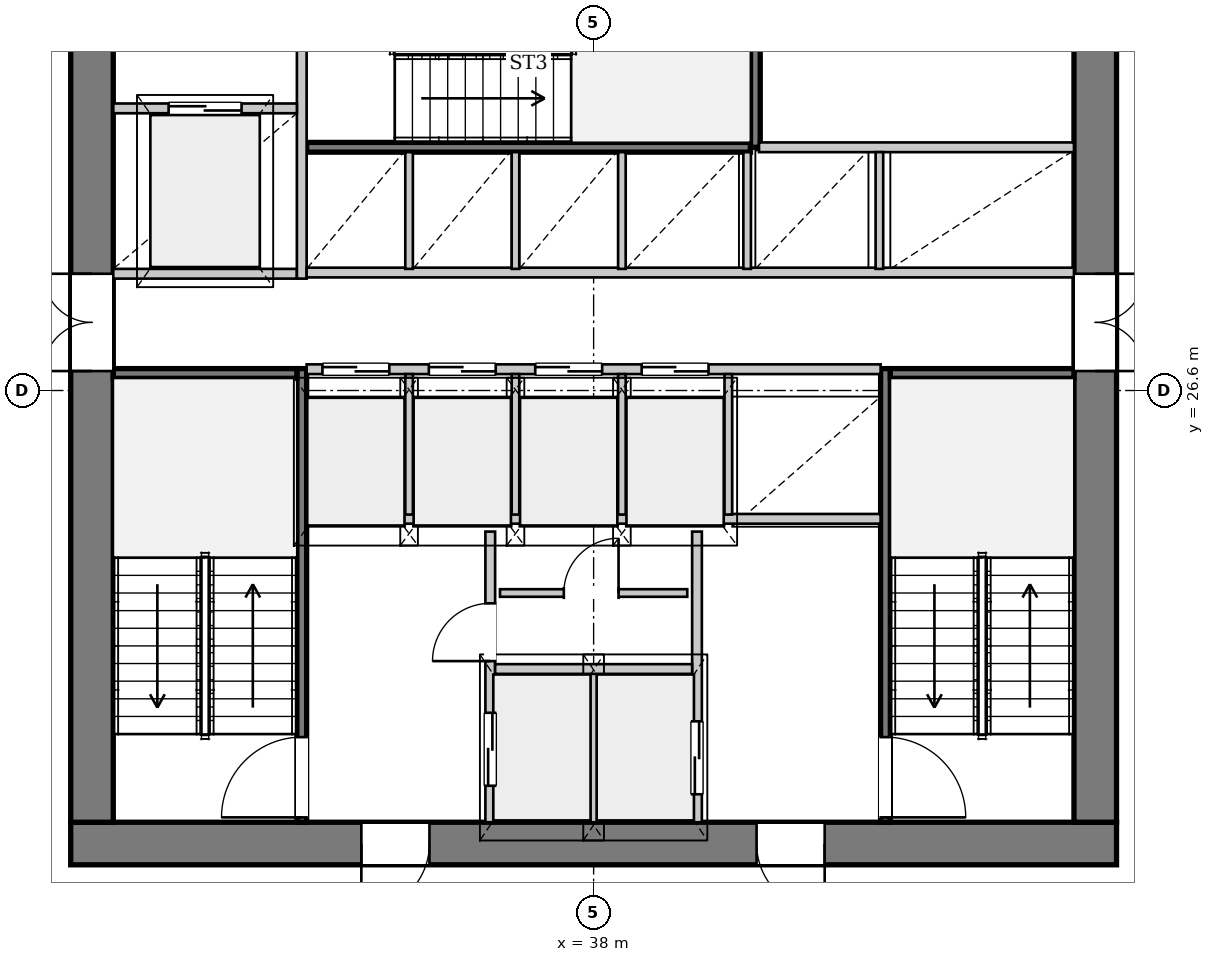
"""IFC4 building model, lengths in metres.
Left out: names, types, materials, properties, quantities, classifications, styles, units other than length and angle.
Written with IfcOpenShell. Run it as: python <this file> out.ifc"""

import sys

from ifc_helpers import new_model, si_unit, direction, frame, frame_2d, origin, place, context, subcontext, project, spatial, rectangle, extrude, source, transform, mapped, element, fill, save


model = new_model("IFC4")
c1 = context("Model", 3, precision=1e-05, world=origin(), true_north=direction((0.0, 1.0)))
c2 = subcontext(c1, "Body", "Model", "MODEL_VIEW")
j1 = project(units=[si_unit("LENGTHUNIT", "METRE"), si_unit("PLANEANGLEUNIT", "RADIAN")], contexts=[c1])
p1 = place(None, origin())
s1 = spatial("IfcSite", under=j1, at=p1, CompositionType="ELEMENT")
p2 = place(p1, origin())
s2 = spatial("IfcBuilding", under=s1, at=p2, CompositionType="ELEMENT")
p3 = place(p2, frame((0.0, 0.0, 95.05)))
s3 = spatial("IfcBuildingStorey", under=s2, at=p3, CompositionType="ELEMENT", Elevation=95.05)
p4 = place(p3, frame((46.6, 19.15, 0.0), z_axis=(0.0, 0.0, 1.0), x_axis=(-1.0, 0.0, 0.0)))
e1 = element("IfcWall", 1, at=p4, inside=s3, PredefinedType="SHEAR", context=c2, shape_type="SweptSolid", body=[
    extrude(rectangle(XDim=17.2, YDim=0.7, at=frame_2d((8.6, 0.0))), origin(), (0.0, 0.0, 1.0), 3.3),
])
p5 = place(p4, frame((4.8, 0.0, 0.0)))
e2 = element("IfcOpeningElement", 2, at=p5, cuts=e1, PredefinedType="OPENING", context=c2, shape_type="SweptSolid", body=[
    extrude(rectangle(XDim=1.12, YDim=2.25, at=frame_2d((0.56, 1.125))), frame((0.0, 0.36, 0.0), z_axis=(0.0, -1.0, 0.0), x_axis=(1.0, 0.0, 0.0)), (0.0, 0.0, 1.0), 0.72),
])
p6 = place(p4, frame((11.3, 0.0, 0.0)))
e3 = element("IfcOpeningElement", 3, at=p6, cuts=e1, PredefinedType="OPENING", context=c2, shape_type="SweptSolid", body=[
    extrude(rectangle(XDim=1.12, YDim=2.25, at=frame_2d((0.56, 1.125))), frame((0.0, 0.36, 0.0), z_axis=(0.0, -1.0, 0.0), x_axis=(1.0, 0.0, 0.0)), (0.0, 0.0, 1.0), 0.72),
])
p7 = place(p3, frame((29.75, 19.5, 0.0), z_axis=(0.0, 0.0, 1.0), x_axis=(0.0, 1.0, 0.0)))
e4 = element("IfcWall", 4, at=p7, inside=s3, PredefinedType="SHEAR", context=c2, shape_type="SweptSolid", body=[
    extrude(rectangle(XDim=14.2, YDim=0.7, at=frame_2d((7.1, 0.0))), origin(), (0.0, 0.0, 1.0), 3.3),
])
p8 = place(p7, frame((7.42, 0.0, 0.0)))
e5 = element("IfcOpeningElement", 5, at=p8, cuts=e4, PredefinedType="OPENING", context=c2, shape_type="SweptSolid", body=[
    extrude(rectangle(XDim=1.6, YDim=2.2, at=frame_2d((0.8, 1.1))), frame((0.0, 0.36, 0.0), z_axis=(0.0, -1.0, 0.0), x_axis=(1.0, 0.0, 0.0)), (0.0, 0.0, 1.0), 0.72),
])
p9 = place(p3, frame((46.25, 33.7, 0.0), z_axis=(0.0, 0.0, 1.0), x_axis=(0.0, -1.0, 0.0)))
e6 = element("IfcWall", 6, at=p9, inside=s3, PredefinedType="SHEAR", context=c2, shape_type="SweptSolid", body=[
    extrude(rectangle(XDim=14.2, YDim=0.7, at=frame_2d((7.1, 0.0))), origin(), (0.0, 0.0, 1.0), 3.3),
])
p10 = place(p9, frame((5.18, 0.0, 0.0)))
e7 = element("IfcOpeningElement", 7, at=p10, cuts=e6, PredefinedType="OPENING", context=c2, shape_type="SweptSolid", body=[
    extrude(rectangle(XDim=1.6, YDim=2.2, at=frame_2d((0.8, 1.1))), frame((0.0, 0.36, 0.0), z_axis=(0.0, -1.0, 0.0), x_axis=(1.0, 0.0, 0.0)), (0.0, 0.0, 1.0), 0.72),
])
p11 = place(p3, frame((33.2, 19.5, 0.0), z_axis=(0.0, 0.0, 1.0), x_axis=(0.0, 1.0, 0.0)))
e8 = element("IfcWall", 8, at=p11, inside=s3, PredefinedType="PARTITIONING", context=c2, shape_type="SweptSolid", body=[
    extrude(rectangle(XDim=7.46, YDim=0.16, at=frame_2d((3.73, 0.0))), origin(), (0.0, 0.0, 1.0), 3.3),
])
p12 = place(p11, frame((0.08, 0.0, 0.0)))
e9 = element("IfcOpeningElement", 9, at=p12, cuts=e8, PredefinedType="OPENING", context=c2, shape_type="SweptSolid", body=[
    extrude(rectangle(XDim=1.32, YDim=2.2, at=frame_2d((0.66, 1.1))), frame((0.0, 0.09, 0.0), z_axis=(0.0, -1.0, 0.0), x_axis=(1.0, 0.0, 0.0)), (0.0, 0.0, 1.0), 0.18),
])
p13 = place(p3, frame((30.1, 26.88, 0.0), z_axis=(0.0, 0.0, 1.0), x_axis=(1.0, 0.0, 0.0)))
e10 = element("IfcWall", 10, at=p13, inside=s3, PredefinedType="PARTITIONING", context=c2, shape_type="SweptSolid", body=[
    extrude(rectangle(XDim=3.02, YDim=0.16, at=frame_2d((1.51, 0.0))), origin(), (0.0, 0.0, 1.0), 3.3),
])
p14 = place(p3, frame((42.8, 26.96, 0.0), z_axis=(0.0, 0.0, 1.0), x_axis=(0.0, -1.0, 0.0)))
e11 = element("IfcWall", 11, at=p14, inside=s3, PredefinedType="PARTITIONING", context=c2, shape_type="SweptSolid", body=[
    extrude(rectangle(XDim=7.46, YDim=0.16, at=frame_2d((3.73, 0.0))), origin(), (0.0, 0.0, 1.0), 3.3),
])
p15 = place(p14, frame((6.06, 0.0, 0.0)))
e12 = element("IfcOpeningElement", 12, at=p15, cuts=e11, PredefinedType="OPENING", context=c2, shape_type="SweptSolid", body=[
    extrude(rectangle(XDim=1.32, YDim=2.2, at=frame_2d((0.66, 1.1))), frame((0.0, 0.09, 0.0), z_axis=(0.0, -1.0, 0.0), x_axis=(1.0, 0.0, 0.0)), (0.0, 0.0, 1.0), 0.18),
])
p16 = place(p3, frame((42.88, 26.88, 0.0), z_axis=(0.0, 0.0, 1.0), x_axis=(1.0, 0.0, 0.0)))
e13 = element("IfcWall", 13, at=p16, inside=s3, PredefinedType="PARTITIONING", context=c2, shape_type="SweptSolid", body=[
    extrude(rectangle(XDim=3.02, YDim=0.16, at=frame_2d((1.51, 0.0))), origin(), (0.0, 0.0, 1.0), 3.3),
])
p17 = place(p3, frame((33.28, 30.6, 0.0), z_axis=(0.0, 0.0, 1.0), x_axis=(1.0, 0.0, 0.0)))
e14 = element("IfcWall", 14, at=p17, inside=s3, PredefinedType="PARTITIONING", context=c2, shape_type="SweptSolid", body=[
    extrude(rectangle(XDim=7.3, YDim=0.16, at=frame_2d((3.65, 0.0))), origin(), (0.0, 0.0, 1.0), 3.3),
])
p18 = place(p3, frame((40.66, 30.6, 0.0), z_axis=(0.0, 0.0, 1.0), x_axis=(0.0, 1.0, 0.0)))
e15 = element("IfcWall", 15, at=p18, inside=s3, PredefinedType="PARTITIONING", context=c2, shape_type="SweptSolid", body=[
    extrude(rectangle(XDim=3.1, YDim=0.16, at=frame_2d((1.55, 0.0))), origin(), (0.0, 0.0, 1.0), 3.3),
])
p19 = place(p3, frame((36.3, 19.5, 0.0), z_axis=(0.0, 0.0, 1.0), x_axis=(0.0, 1.0, 0.0)))
e16 = element("IfcWall", 16, at=p19, inside=s3, PredefinedType="PARTITIONING", context=c2, shape_type="SweptSolid", body=[
    extrude(rectangle(XDim=4.78, YDim=0.16, at=frame_2d((2.39, 0.0))), origin(), (0.0, 0.0, 1.0), 3.3),
])
p20 = place(p19, frame((0.6, 0.0, 0.0)))
e17 = element("IfcOpeningElement", 17, at=p20, cuts=e16, PredefinedType="OPENING", context=c2, shape_type="SweptSolid", body=[
    extrude(rectangle(XDim=1.2, YDim=2.2, at=frame_2d((0.6, 1.1))), frame((0.0, 0.09, 0.0), z_axis=(0.0, -1.0, 0.0), x_axis=(1.0, 0.0, 0.0)), (0.0, 0.0, 1.0), 0.18),
])
p21 = place(p19, frame((2.65, 0.0, 0.0)))
e18 = element("IfcOpeningElement", 18, at=p21, cuts=e16, PredefinedType="OPENING", context=c2, shape_type="SweptSolid", body=[
    extrude(rectangle(XDim=0.95, YDim=2.1, at=frame_2d((0.475, 1.05))), frame((0.0, 0.09, 0.0), z_axis=(0.0, -1.0, 0.0), x_axis=(1.0, 0.0, 0.0)), (0.0, 0.0, 1.0), 0.18),
])
p22 = place(p3, frame((39.7, 24.28, 0.0), z_axis=(0.0, 0.0, 1.0), x_axis=(0.0, -1.0, 0.0)))
e19 = element("IfcWall", 19, at=p22, inside=s3, PredefinedType="PARTITIONING", context=c2, shape_type="SweptSolid", body=[
    extrude(rectangle(XDim=4.78, YDim=0.16, at=frame_2d((2.39, 0.0))), origin(), (0.0, 0.0, 1.0), 3.3),
])
p23 = place(p22, frame((3.12, 0.0, 0.0)))
e20 = element("IfcOpeningElement", 20, at=p23, cuts=e19, PredefinedType="OPENING", context=c2, shape_type="SweptSolid", body=[
    extrude(rectangle(XDim=1.2, YDim=2.2, at=frame_2d((0.6, 1.1))), frame((0.0, 0.09, 0.0), z_axis=(0.0, -1.0, 0.0), x_axis=(1.0, 0.0, 0.0)), (0.0, 0.0, 1.0), 0.18),
])
p24 = place(p3, frame((38.0, 19.5, 0.0), z_axis=(0.0, 0.0, 1.0), x_axis=(0.0, 1.0, 0.0)))
e21 = element("IfcWall", 21, at=p24, inside=s3, PredefinedType="PARTITIONING", context=c2, shape_type="SweptSolid", body=[
    extrude(rectangle(XDim=2.46, YDim=0.125, at=frame_2d((1.23, 0.0))), origin(), (0.0, 0.0, 1.0), 3.3),
])
p25 = place(p3, frame((36.38, 22.02, 0.0), z_axis=(0.0, 0.0, 1.0), x_axis=(1.0, 0.0, 0.0)))
e22 = element("IfcWall", 22, at=p25, inside=s3, PredefinedType="PARTITIONING", context=c2, shape_type="SweptSolid", body=[
    extrude(rectangle(XDim=3.24, YDim=0.16, at=frame_2d((1.62, 0.0))), origin(), (0.0, 0.0, 1.0), 3.3),
])
p26 = place(p3, frame((33.28, 24.49, 0.0), z_axis=(0.0, 0.0, 1.0), x_axis=(1.0, 0.0, 0.0)))
e23 = element("IfcWall", 23, at=p26, inside=s3, PredefinedType="PARTITIONING", context=c2, shape_type="SweptSolid", body=[
    extrude(rectangle(XDim=9.44, YDim=0.16, at=frame_2d((4.72, 0.0))), origin(), (0.0, 0.0, 1.0), 3.3),
])
p27 = place(p3, frame((36.46, 23.27, 0.0), z_axis=(0.0, 0.0, 1.0), x_axis=(1.0, 0.0, 0.0)))
e24 = element("IfcWall", 24, at=p27, inside=s3, PredefinedType="PARTITIONING", context=c2, shape_type="SweptSolid", body=[
    extrude(rectangle(XDim=3.08, YDim=0.125, at=frame_2d((1.54, 0.0))), origin(), (0.0, 0.0, 1.0), 3.3),
])
p28 = place(p27, frame((1.05, 0.0, 0.0)))
e25 = element("IfcOpeningElement", 25, at=p28, cuts=e24, PredefinedType="OPENING", context=c2, shape_type="SweptSolid", body=[
    extrude(rectangle(XDim=0.9, YDim=2.1, at=frame_2d((0.45, 1.05))), frame((0.0, 0.073, 0.0), z_axis=(0.0, -1.0, 0.0), x_axis=(1.0, 0.0, 0.0)), (0.0, 0.0, 1.0), 0.145),
])
p29 = place(p3, frame((30.1, 28.52, 0.0), z_axis=(0.0, 0.0, 1.0), x_axis=(1.0, 0.0, 0.0)))
e26 = element("IfcWall", 26, at=p29, inside=s3, PredefinedType="PARTITIONING", context=c2, shape_type="SweptSolid", body=[
    extrude(rectangle(XDim=3.02, YDim=0.16, at=frame_2d((1.51, 0.0))), origin(), (0.0, 0.0, 1.0), 3.3),
])
p30 = place(p3, frame((33.2, 28.44, 0.0), z_axis=(0.0, 0.0, 1.0), x_axis=(0.0, 1.0, 0.0)))
e27 = element("IfcWall", 27, at=p30, inside=s3, PredefinedType="PARTITIONING", context=c2, shape_type="SweptSolid", body=[
    extrude(rectangle(XDim=5.26, YDim=0.16, at=frame_2d((2.63, 0.0))), origin(), (0.0, 0.0, 1.0), 3.3),
])
p31 = place(p3, frame((30.1, 31.24, 0.0), z_axis=(0.0, 0.0, 1.0), x_axis=(1.0, 0.0, 0.0)))
e28 = element("IfcWall", 28, at=p31, inside=s3, PredefinedType="PARTITIONING", context=c2, shape_type="SweptSolid", body=[
    extrude(rectangle(XDim=3.02, YDim=0.16, at=frame_2d((1.51, 0.0))), origin(), (0.0, 0.0, 1.0), 3.3),
])
p32 = place(p31, frame((0.91, 0.0, 0.0)))
e29 = element("IfcOpeningElement", 29, at=p32, cuts=e28, PredefinedType="OPENING", context=c2, shape_type="SweptSolid", body=[
    extrude(rectangle(XDim=1.2, YDim=2.2, at=frame_2d((0.6, 1.1))), frame((0.0, 0.09, 0.0), z_axis=(0.0, -1.0, 0.0), x_axis=(1.0, 0.0, 0.0)), (0.0, 0.0, 1.0), 0.18),
])
p33 = place(p3, frame((33.28, 26.95, 0.0), z_axis=(0.0, 0.0, 1.0), x_axis=(1.0, 0.0, 0.0)))
e30 = element("IfcWall", 30, at=p33, inside=s3, PredefinedType="PARTITIONING", context=c2, shape_type="SweptSolid", body=[
    extrude(rectangle(XDim=9.44, YDim=0.16, at=frame_2d((4.72, 0.0))), origin(), (0.0, 0.0, 1.0), 3.3),
])
p34 = place(p33, frame((0.26, 0.0, 0.0)))
e31 = element("IfcOpeningElement", 31, at=p34, cuts=e30, PredefinedType="OPENING", context=c2, shape_type="SweptSolid", body=[
    extrude(rectangle(XDim=1.1, YDim=2.2, at=frame_2d((0.55, 1.1))), frame((0.0, 0.09, 0.0), z_axis=(0.0, -1.0, 0.0), x_axis=(1.0, 0.0, 0.0)), (0.0, 0.0, 1.0), 0.18),
])
p35 = place(p33, frame((2.01, 0.0, 0.0)))
e32 = element("IfcOpeningElement", 32, at=p35, cuts=e30, PredefinedType="OPENING", context=c2, shape_type="SweptSolid", body=[
    extrude(rectangle(XDim=1.1, YDim=2.2, at=frame_2d((0.55, 1.1))), frame((0.0, 0.09, 0.0), z_axis=(0.0, -1.0, 0.0), x_axis=(1.0, 0.0, 0.0)), (0.0, 0.0, 1.0), 0.18),
])
p36 = place(p33, frame((3.76, 0.0, 0.0)))
e33 = element("IfcOpeningElement", 33, at=p36, cuts=e30, PredefinedType="OPENING", context=c2, shape_type="SweptSolid", body=[
    extrude(rectangle(XDim=1.1, YDim=2.2, at=frame_2d((0.55, 1.1))), frame((0.0, 0.09, 0.0), z_axis=(0.0, -1.0, 0.0), x_axis=(1.0, 0.0, 0.0)), (0.0, 0.0, 1.0), 0.18),
])
p37 = place(p33, frame((5.51, 0.0, 0.0)))
e34 = element("IfcOpeningElement", 34, at=p37, cuts=e30, PredefinedType="OPENING", context=c2, shape_type="SweptSolid", body=[
    extrude(rectangle(XDim=1.1, YDim=2.2, at=frame_2d((0.55, 1.1))), frame((0.0, 0.09, 0.0), z_axis=(0.0, -1.0, 0.0), x_axis=(1.0, 0.0, 0.0)), (0.0, 0.0, 1.0), 0.18),
])
for number, where, z_axis, x_axis in (
    (35, (34.965, 24.56, 0.0), (0.0, 0.0, 1.0), (0.0, 1.0, 0.0)),
    (36, (36.715, 24.56, 0.0), (0.0, 0.0, 1.0), (0.0, 1.0, 0.0)),
    (37, (38.465, 24.56, 0.0), (0.0, 0.0, 1.0), (0.0, 1.0, 0.0)),
    (38, (40.215, 24.56, 0.0), (0.0, 0.0, 1.0), (0.0, 1.0, 0.0)),
):
    element("IfcWall", number, at=place(p3, frame(where, z_axis=z_axis, x_axis=x_axis)), inside=s3, PredefinedType="PARTITIONING", context=c2, shape_type="SweptSolid", body=[
        extrude(rectangle(XDim=2.31, YDim=0.125, at=frame_2d((1.155, 0.0))), origin(), (0.0, 0.0, 1.0), 3.3),
    ])
p38 = place(p3, frame((33.28, 28.54, 0.0), z_axis=(0.0, 0.0, 1.0), x_axis=(1.0, 0.0, 0.0)))
e39 = element("IfcWall", 39, at=p38, inside=s3, PredefinedType="PARTITIONING", context=c2, shape_type="SweptSolid", body=[
    extrude(rectangle(XDim=12.62, YDim=0.16, at=frame_2d((6.31, 0.0))), origin(), (0.0, 0.0, 1.0), 3.3),
])
p39 = place(p3, frame((40.72, 30.6, 0.0), z_axis=(0.0, 0.0, 1.0), x_axis=(1.0, 0.0, 0.0)))
e40 = element("IfcWall", 40, at=p39, inside=s3, PredefinedType="PARTITIONING", context=c2, shape_type="SweptSolid", body=[
    extrude(rectangle(XDim=5.18, YDim=0.16, at=frame_2d((2.59, 0.0))), origin(), (0.0, 0.0, 1.0), 3.3),
])
for number, where, z_axis, x_axis in (
    (41, (34.965, 28.6, 0.0), (0.0, 0.0, 1.0), (0.0, 1.0, 0.0)),
    (42, (36.715, 28.6, 0.0), (0.0, 0.0, 1.0), (0.0, 1.0, 0.0)),
    (43, (38.465, 28.6, 0.0), (0.0, 0.0, 1.0), (0.0, 1.0, 0.0)),
    (44, (40.525, 28.6, 0.0), (0.0, 0.0, 1.0), (0.0, 1.0, 0.0)),
    (45, (42.7, 28.6, 0.0), (0.0, 0.0, 1.0), (0.0, 1.0, 0.0)),
):
    element("IfcWall", number, at=place(p3, frame(where, z_axis=z_axis, x_axis=x_axis)), inside=s3, PredefinedType="PARTITIONING", context=c2, shape_type="SweptSolid", body=[
        extrude(rectangle(XDim=1.92, YDim=0.125, at=frame_2d((0.96, 0.0))), origin(), (0.0, 0.0, 1.0), 3.3),
    ])
m1 = source(origin(), c2, "Body", "SweptSolid", [
    extrude(rectangle(XDim=1.12, YDim=2.25, at=frame_2d((0.56, 1.125))), frame((0.0, 0.025, 0.0), z_axis=(0.0, -1.0, 0.0), x_axis=(1.0, 0.0, 0.0)), (0.0, 0.0, 1.0), 0.05),
])
p40 = place(p5, origin())
e46 = element("IfcDoor", 46, at=p40, inside=s3, OperationType="SINGLE_SWING_LEFT", PredefinedType="DOOR", context=c2, shape_type="MappedRepresentation", body=[
    mapped(m1, transform((0.0, 0.0, 0.0), x_axis=(1.0, 0.0, 0.0), y_axis=(0.0, 1.0, 0.0), z_axis=(0.0, 0.0, 1.0), scale=1.0)),
])
fill(e2, e46)
p41 = place(p6, origin())
e47 = element("IfcDoor", 47, at=p41, inside=s3, OperationType="SINGLE_SWING_RIGHT", PredefinedType="DOOR", context=c2, shape_type="MappedRepresentation", body=[
    mapped(m1, transform((0.0, 0.0, 0.0), x_axis=(1.0, 0.0, 0.0), y_axis=(0.0, 1.0, 0.0), z_axis=(0.0, 0.0, 1.0), scale=1.0)),
])
fill(e3, e47)
m2 = source(origin(), c2, "Body", "SweptSolid", [
    extrude(rectangle(XDim=1.6, YDim=2.2, at=frame_2d((0.8, 1.1))), frame((0.0, 0.025, 0.0), z_axis=(0.0, -1.0, 0.0), x_axis=(1.0, 0.0, 0.0)), (0.0, 0.0, 1.0), 0.05),
])
p42 = place(p8, origin())
e48 = element("IfcDoor", 48, at=p42, inside=s3, OperationType="DOUBLE_DOOR_SINGLE_SWING", PredefinedType="DOOR", context=c2, shape_type="MappedRepresentation", body=[
    mapped(m2, transform((0.0, 0.0, 0.0), x_axis=(1.0, 0.0, 0.0), y_axis=(0.0, 1.0, 0.0), z_axis=(0.0, 0.0, 1.0), scale=1.0)),
])
fill(e5, e48)
p43 = place(p10, origin())
e49 = element("IfcDoor", 49, at=p43, inside=s3, OperationType="DOUBLE_DOOR_SINGLE_SWING", PredefinedType="DOOR", context=c2, shape_type="MappedRepresentation", body=[
    mapped(m2, transform((0.0, 0.0, 0.0), x_axis=(1.0, 0.0, 0.0), y_axis=(0.0, 1.0, 0.0), z_axis=(0.0, 0.0, 1.0), scale=1.0)),
])
fill(e7, e49)
m3 = source(origin(), c2, "Body", "SweptSolid", [
    extrude(rectangle(XDim=1.32, YDim=2.2, at=frame_2d((0.66, 1.1))), frame((0.0, 0.025, 0.0), z_axis=(0.0, -1.0, 0.0), x_axis=(1.0, 0.0, 0.0)), (0.0, 0.0, 1.0), 0.05),
])
p44 = place(p12, origin())
e50 = element("IfcDoor", 50, at=p44, inside=s3, OperationType="SINGLE_SWING_LEFT", PredefinedType="DOOR", context=c2, shape_type="MappedRepresentation", body=[
    mapped(m3, transform((0.0, 0.0, 0.0), x_axis=(1.0, 0.0, 0.0), y_axis=(0.0, 1.0, 0.0), z_axis=(0.0, 0.0, 1.0), scale=1.0)),
])
fill(e9, e50)
p45 = place(p15, origin())
e51 = element("IfcDoor", 51, at=p45, inside=s3, OperationType="SINGLE_SWING_RIGHT", PredefinedType="DOOR", context=c2, shape_type="MappedRepresentation", body=[
    mapped(m3, transform((0.0, 0.0, 0.0), x_axis=(1.0, 0.0, 0.0), y_axis=(0.0, 1.0, 0.0), z_axis=(0.0, 0.0, 1.0), scale=1.0)),
])
fill(e12, e51)
m4 = source(origin(), c2, "Body", "SweptSolid", [
    extrude(rectangle(XDim=1.2, YDim=2.2, at=frame_2d((0.6, 1.1))), frame((0.0, 0.025, 0.0), z_axis=(0.0, -1.0, 0.0), x_axis=(1.0, 0.0, 0.0)), (0.0, 0.0, 1.0), 0.05),
])
p46 = place(p20, origin())
e52 = element("IfcDoor", 52, at=p46, inside=s3, OperationType="DOUBLE_DOOR_SLIDING", PredefinedType="DOOR", context=c2, shape_type="MappedRepresentation", body=[
    mapped(m4, transform((0.0, 0.0, 0.0), x_axis=(1.0, 0.0, 0.0), y_axis=(0.0, 1.0, 0.0), z_axis=(0.0, 0.0, 1.0), scale=1.0)),
])
fill(e17, e52)
m5 = source(origin(), c2, "Body", "SweptSolid", [
    extrude(rectangle(XDim=0.95, YDim=2.1, at=frame_2d((0.475, 1.05))), frame((0.0, 0.025, 0.0), z_axis=(0.0, -1.0, 0.0), x_axis=(1.0, 0.0, 0.0)), (0.0, 0.0, 1.0), 0.05),
])
p47 = place(p21, origin())
e53 = element("IfcDoor", 53, at=p47, inside=s3, OperationType="SINGLE_SWING_LEFT", PredefinedType="DOOR", context=c2, shape_type="MappedRepresentation", body=[
    mapped(m5, transform((0.0, 0.0, 0.0), x_axis=(1.0, 0.0, 0.0), y_axis=(0.0, 1.0, 0.0), z_axis=(0.0, 0.0, 1.0), scale=1.0)),
])
fill(e18, e53)
m6 = source(origin(), c2, "Body", "SweptSolid", [
    extrude(rectangle(XDim=0.9, YDim=2.1, at=frame_2d((0.45, 1.05))), frame((0.0, 0.025, 0.0), z_axis=(0.0, -1.0, 0.0), x_axis=(1.0, 0.0, 0.0)), (0.0, 0.0, 1.0), 0.05),
])
p48 = place(p28, origin())
e54 = element("IfcDoor", 54, at=p48, inside=s3, OperationType="SINGLE_SWING_RIGHT", PredefinedType="DOOR", context=c2, shape_type="MappedRepresentation", body=[
    mapped(m6, transform((0.0, 0.0, 0.0), x_axis=(1.0, 0.0, 0.0), y_axis=(0.0, 1.0, 0.0), z_axis=(0.0, 0.0, 1.0), scale=1.0)),
])
fill(e25, e54)
p49 = place(p23, origin())
e55 = element("IfcDoor", 55, at=p49, inside=s3, OperationType="DOUBLE_DOOR_SLIDING", PredefinedType="DOOR", context=c2, shape_type="MappedRepresentation", body=[
    mapped(m4, transform((0.0, 0.0, 0.0), x_axis=(1.0, 0.0, 0.0), y_axis=(0.0, 1.0, 0.0), z_axis=(0.0, 0.0, 1.0), scale=1.0)),
])
fill(e20, e55)
p50 = place(p32, origin())
e56 = element("IfcDoor", 56, at=p50, inside=s3, OperationType="DOUBLE_DOOR_SLIDING", PredefinedType="DOOR", context=c2, shape_type="MappedRepresentation", body=[
    mapped(m4, transform((0.0, 0.0, 0.0), x_axis=(1.0, 0.0, 0.0), y_axis=(0.0, 1.0, 0.0), z_axis=(0.0, 0.0, 1.0), scale=1.0)),
])
fill(e29, e56)
m7 = source(origin(), c2, "Body", "SweptSolid", [
    extrude(rectangle(XDim=1.1, YDim=2.2, at=frame_2d((0.55, 1.1))), frame((0.0, 0.025, 0.0), z_axis=(0.0, -1.0, 0.0), x_axis=(1.0, 0.0, 0.0)), (0.0, 0.0, 1.0), 0.05),
])
p51 = place(p34, origin())
e57 = element("IfcDoor", 57, at=p51, inside=s3, OperationType="DOUBLE_DOOR_SLIDING", PredefinedType="DOOR", context=c2, shape_type="MappedRepresentation", body=[
    mapped(m7, transform((0.0, 0.0, 0.0), x_axis=(1.0, 0.0, 0.0), y_axis=(0.0, 1.0, 0.0), z_axis=(0.0, 0.0, 1.0), scale=1.0)),
])
fill(e31, e57)
p52 = place(p35, origin())
e58 = element("IfcDoor", 58, at=p52, inside=s3, OperationType="DOUBLE_DOOR_SLIDING", PredefinedType="DOOR", context=c2, shape_type="MappedRepresentation", body=[
    mapped(m7, transform((0.0, 0.0, 0.0), x_axis=(1.0, 0.0, 0.0), y_axis=(0.0, 1.0, 0.0), z_axis=(0.0, 0.0, 1.0), scale=1.0)),
])
fill(e32, e58)
p53 = place(p36, origin())
e59 = element("IfcDoor", 59, at=p53, inside=s3, OperationType="DOUBLE_DOOR_SLIDING", PredefinedType="DOOR", context=c2, shape_type="MappedRepresentation", body=[
    mapped(m7, transform((0.0, 0.0, 0.0), x_axis=(1.0, 0.0, 0.0), y_axis=(0.0, 1.0, 0.0), z_axis=(0.0, 0.0, 1.0), scale=1.0)),
])
fill(e33, e59)
p54 = place(p37, origin())
e60 = element("IfcDoor", 60, at=p54, inside=s3, OperationType="DOUBLE_DOOR_SLIDING", PredefinedType="DOOR", context=c2, shape_type="MappedRepresentation", body=[
    mapped(m7, transform((0.0, 0.0, 0.0), x_axis=(1.0, 0.0, 0.0), y_axis=(0.0, 1.0, 0.0), z_axis=(0.0, 0.0, 1.0), scale=1.0)),
])
fill(e34, e60)
save(model, sys.argv[1])
